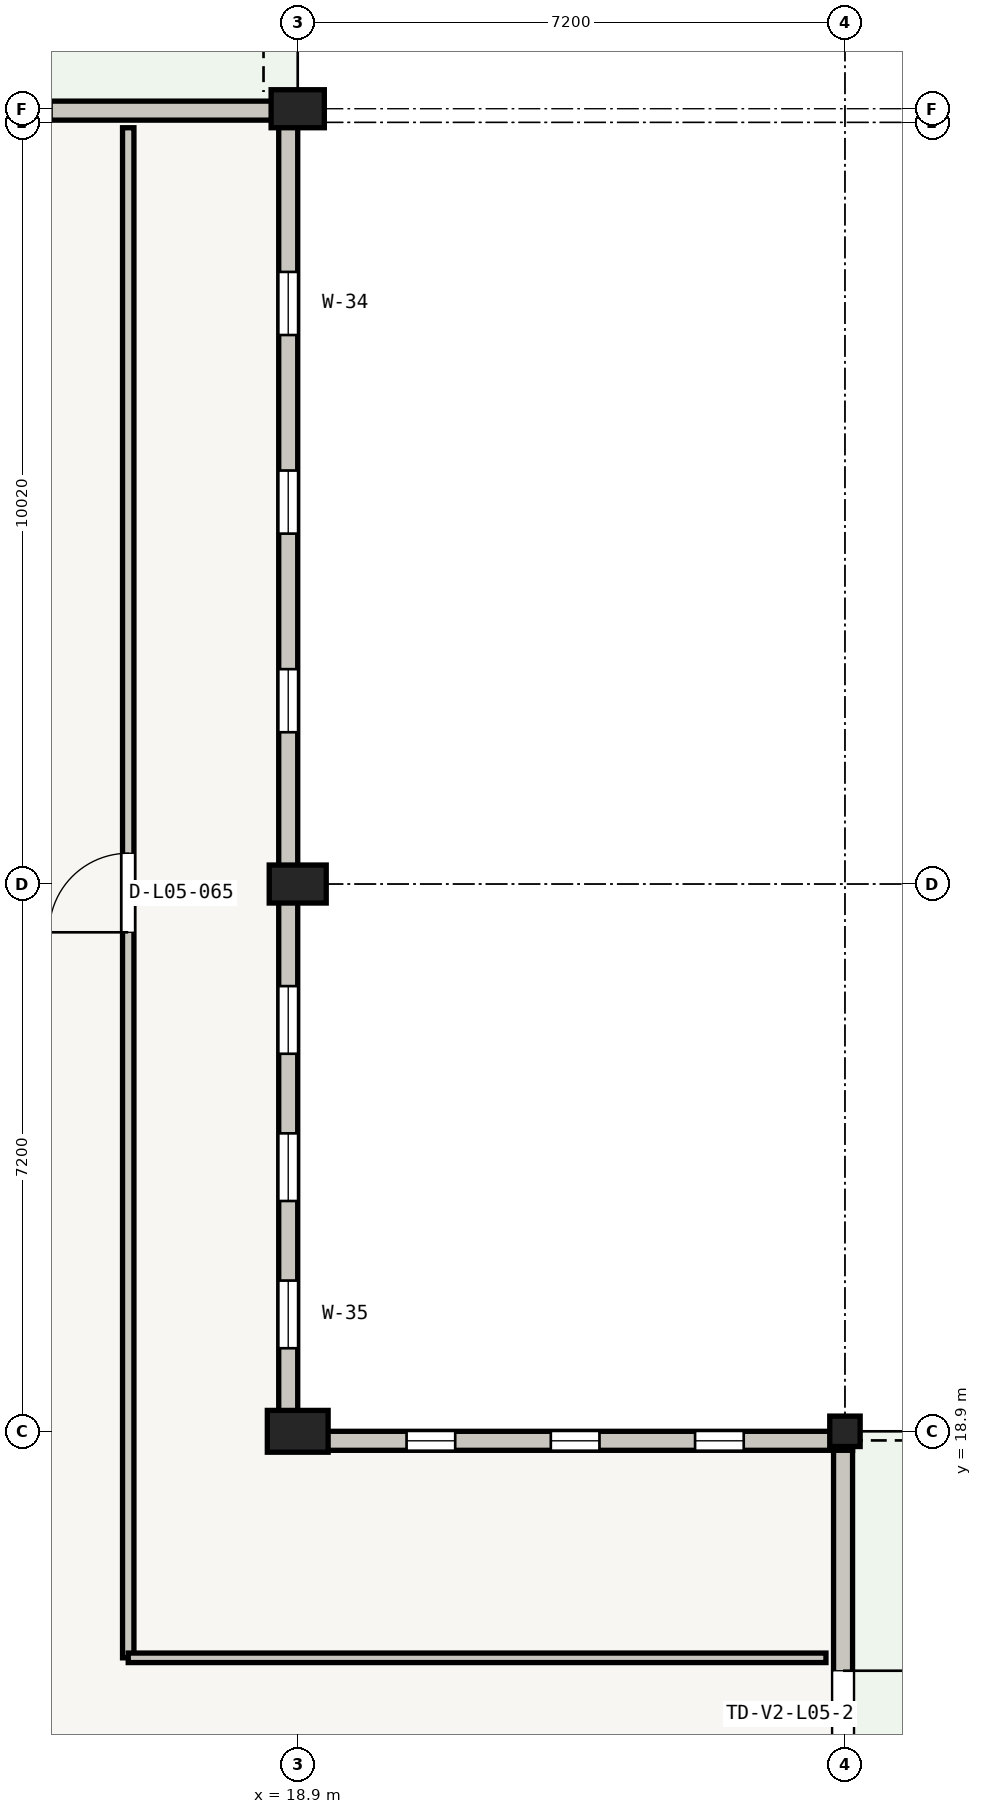
"""IFC4 building model, lengths in metres.
Left out: names, types, materials, properties, quantities, classifications, styles, units other than length and angle.
Written with IfcOpenShell. Run it as: python <this file> out.ifc"""

import sys

from ifc_helpers import new_model, si_unit, direction, frame, frame_2d, origin, origin_2d, place, context, subcontext, project, spatial, rectangle, extrude, element, fill, save


model = new_model("IFC4")
c1 = context("Model", 3, precision=1e-05, world=origin(), true_north=direction((0.0, 1.0)))
c2 = subcontext(c1, "Body", "Model", "MODEL_VIEW")
j1 = project(units=[si_unit("LENGTHUNIT", "METRE"), si_unit("PLANEANGLEUNIT", "RADIAN")], contexts=[c1])
p1 = place(None, origin())
s1 = spatial("IfcSite", under=j1, at=p1, CompositionType="ELEMENT")
p2 = place(p1, origin())
s2 = spatial("IfcBuilding", under=s1, at=p2, CompositionType="ELEMENT")
p3 = place(p2, frame((0.0, 0.0, 21.15)))
s3 = spatial("IfcBuildingStorey", under=s2, at=p3, CompositionType="ELEMENT", Elevation=21.15)
p4 = place(p3, frame((18.9, 18.9, 0.0), z_axis=(0.0, 0.0, 1.0), x_axis=(1.0, 0.0, 0.0)))
e1 = element("IfcColumn", 1, at=p4, inside=s3, PredefinedType="COLUMN", context=c2, shape_type="SweptSolid", body=[
    extrude(rectangle(XDim=0.8, YDim=0.55, at=origin_2d()), origin(), (0.0, 0.0, 1.0), 3.62),
])
p5 = place(p3, frame((18.9, 26.1, 0.0), z_axis=(0.0, 0.0, 1.0), x_axis=(1.0, 0.0, 0.0)))
e2 = element("IfcColumn", 2, at=p5, inside=s3, PredefinedType="COLUMN", context=c2, shape_type="SweptSolid", body=[
    extrude(rectangle(XDim=0.75, YDim=0.5, at=origin_2d()), origin(), (0.0, 0.0, 1.0), 3.62),
])
p6 = place(p3, frame((18.9, 36.3, 0.0), z_axis=(0.0, 0.0, 1.0), x_axis=(1.0, 0.0, 0.0)))
e3 = element("IfcColumn", 3, at=p6, inside=s3, PredefinedType="COLUMN", context=c2, shape_type="SweptSolid", body=[
    extrude(rectangle(XDim=0.7, YDim=0.5, at=origin_2d()), origin(), (0.0, 0.0, 1.0), 3.62),
])
p7 = place(p3, frame((26.1, 18.9, 0.0), z_axis=(0.0, 0.0, 1.0), x_axis=(1.0, 0.0, 0.0)))
e4 = element("IfcColumn", 4, at=p7, inside=s3, PredefinedType="COLUMN", context=c2, shape_type="SweptSolid", body=[
    extrude(rectangle(XDim=0.4, YDim=0.4, at=origin_2d()), origin(), (0.0, 0.0, 1.0), 3.62),
])
p8 = place(p3, frame((11.7, 36.275, 0.0), z_axis=(0.0, 0.0, 1.0), x_axis=(1.0, 0.0, 0.0)))
e5 = element("IfcWall", 5, at=p8, inside=s3, PredefinedType="STANDARD", context=c2, shape_type="SweptSolid", body=[
    extrude(rectangle(XDim=7.2, YDim=0.25, at=frame_2d((3.6, 0.0))), origin(), (0.0, 0.0, 1.0), 2.885),
])
p9 = place(p8, frame((1.368, 0.0, 0.6)))
e6 = element("IfcOpeningElement", 6, at=p9, cuts=e5, PredefinedType="OPENING", context=c2, shape_type="SweptSolid", body=[
    extrude(rectangle(XDim=0.72, YDim=1.85, at=frame_2d((0.36, 0.925))), frame((0.0, 0.125, 0.0), z_axis=(0.0, -1.0, 0.0), x_axis=(1.0, 0.0, 0.0)), (0.0, 0.0, 1.0), 0.25),
])
p10 = place(p8, frame((3.24, 0.0, 0.6)))
e7 = element("IfcOpeningElement", 7, at=p10, cuts=e5, PredefinedType="OPENING", context=c2, shape_type="SweptSolid", body=[
    extrude(rectangle(XDim=0.72, YDim=1.85, at=frame_2d((0.36, 0.925))), frame((0.0, 0.125, 0.0), z_axis=(0.0, -1.0, 0.0), x_axis=(1.0, 0.0, 0.0)), (0.0, 0.0, 1.0), 0.25),
])
p11 = place(p3, frame((18.775, 36.15, 0.0), z_axis=(0.0, 0.0, 1.0), x_axis=(0.0, -1.0, 0.0)))
e8 = element("IfcWall", 8, at=p11, inside=s3, PredefinedType="STANDARD", context=c2, shape_type="SweptSolid", body=[
    extrude(rectangle(XDim=10.05, YDim=0.25, at=frame_2d((5.025, 0.0))), origin(), (0.0, 0.0, 1.0), 2.885),
])
p12 = place(p11, frame((1.997, 0.0, 0.55)))
e9 = element("IfcOpeningElement", 9, at=p12, cuts=e8, PredefinedType="OPENING", context=c2, shape_type="SweptSolid", body=[
    extrude(rectangle(XDim=0.83, YDim=2.06, at=frame_2d((0.415, 1.03))), frame((0.0, 0.125, 0.0), z_axis=(0.0, -1.0, 0.0), x_axis=(1.0, 0.0, 0.0)), (0.0, 0.0, 1.0), 0.25),
])
p13 = place(p11, frame((4.61, 0.0, 0.55)))
e10 = element("IfcOpeningElement", 10, at=p13, cuts=e8, PredefinedType="OPENING", context=c2, shape_type="SweptSolid", body=[
    extrude(rectangle(XDim=0.83, YDim=2.06, at=frame_2d((0.415, 1.03))), frame((0.0, 0.125, 0.0), z_axis=(0.0, -1.0, 0.0), x_axis=(1.0, 0.0, 0.0)), (0.0, 0.0, 1.0), 0.25),
])
p14 = place(p11, frame((7.223, 0.0, 0.55)))
e11 = element("IfcOpeningElement", 11, at=p14, cuts=e8, PredefinedType="OPENING", context=c2, shape_type="SweptSolid", body=[
    extrude(rectangle(XDim=0.83, YDim=2.06, at=frame_2d((0.415, 1.03))), frame((0.0, 0.125, 0.0), z_axis=(0.0, -1.0, 0.0), x_axis=(1.0, 0.0, 0.0)), (0.0, 0.0, 1.0), 0.25),
])
p15 = place(p3, frame((18.775, 26.1, 0.0), z_axis=(0.0, 0.0, 1.0), x_axis=(0.0, -1.0, 0.0)))
e12 = element("IfcWall", 12, at=p15, inside=s3, PredefinedType="STANDARD", context=c2, shape_type="SweptSolid", body=[
    extrude(rectangle(XDim=7.45, YDim=0.25, at=frame_2d((3.725, 0.0))), origin(), (0.0, 0.0, 1.0), 2.885),
])
p16 = place(p15, frame((1.343, 0.0, 0.55)))
e13 = element("IfcOpeningElement", 13, at=p16, cuts=e12, PredefinedType="OPENING", context=c2, shape_type="SweptSolid", body=[
    extrude(rectangle(XDim=0.89, YDim=2.02, at=frame_2d((0.445, 1.01))), frame((0.0, 0.125, 0.0), z_axis=(0.0, -1.0, 0.0), x_axis=(1.0, 0.0, 0.0)), (0.0, 0.0, 1.0), 0.25),
])
p17 = place(p15, frame((3.28, 0.0, 0.55)))
e14 = element("IfcOpeningElement", 14, at=p17, cuts=e12, PredefinedType="OPENING", context=c2, shape_type="SweptSolid", body=[
    extrude(rectangle(XDim=0.89, YDim=2.02, at=frame_2d((0.445, 1.01))), frame((0.0, 0.125, 0.0), z_axis=(0.0, -1.0, 0.0), x_axis=(1.0, 0.0, 0.0)), (0.0, 0.0, 1.0), 0.25),
])
p18 = place(p15, frame((5.217, 0.0, 0.55)))
e15 = element("IfcOpeningElement", 15, at=p18, cuts=e12, PredefinedType="OPENING", context=c2, shape_type="SweptSolid", body=[
    extrude(rectangle(XDim=0.89, YDim=2.02, at=frame_2d((0.445, 1.01))), frame((0.0, 0.125, 0.0), z_axis=(0.0, -1.0, 0.0), x_axis=(1.0, 0.0, 0.0)), (0.0, 0.0, 1.0), 0.25),
])
p19 = place(p3, frame((18.9, 18.775, 0.0), z_axis=(0.0, 0.0, 1.0), x_axis=(1.0, 0.0, 0.0)))
e16 = element("IfcWall", 16, at=p19, inside=s3, PredefinedType="STANDARD", context=c2, shape_type="SweptSolid", body=[
    extrude(rectangle(XDim=7.3, YDim=0.25, at=frame_2d((3.65, 0.0))), origin(), (0.0, 0.0, 1.0), 2.655),
])
p20 = place(p19, frame((1.432, 0.0, 0.55)))
e17 = element("IfcOpeningElement", 17, at=p20, cuts=e16, PredefinedType="OPENING", context=c2, shape_type="SweptSolid", body=[
    extrude(rectangle(XDim=0.64, YDim=1.85, at=frame_2d((0.32, 0.925))), frame((0.0, 0.125, 0.0), z_axis=(0.0, -1.0, 0.0), x_axis=(1.0, 0.0, 0.0)), (0.0, 0.0, 1.0), 0.25),
])
p21 = place(p19, frame((3.33, 0.0, 0.55)))
e18 = element("IfcOpeningElement", 18, at=p21, cuts=e16, PredefinedType="OPENING", context=c2, shape_type="SweptSolid", body=[
    extrude(rectangle(XDim=0.64, YDim=1.85, at=frame_2d((0.32, 0.925))), frame((0.0, 0.125, 0.0), z_axis=(0.0, -1.0, 0.0), x_axis=(1.0, 0.0, 0.0)), (0.0, 0.0, 1.0), 0.25),
])
p22 = place(p19, frame((5.228, 0.0, 0.55)))
e19 = element("IfcOpeningElement", 19, at=p22, cuts=e16, PredefinedType="OPENING", context=c2, shape_type="SweptSolid", body=[
    extrude(rectangle(XDim=0.64, YDim=1.85, at=frame_2d((0.32, 0.925))), frame((0.0, 0.125, 0.0), z_axis=(0.0, -1.0, 0.0), x_axis=(1.0, 0.0, 0.0)), (0.0, 0.0, 1.0), 0.25),
])
p23 = place(p3, frame((26.075, 18.65, 0.0), z_axis=(0.0, 0.0, 1.0), x_axis=(0.0, -1.0, 0.0)))
e20 = element("IfcWall", 20, at=p23, inside=s3, PredefinedType="STANDARD", context=c2, shape_type="SweptSolid", body=[
    extrude(rectangle(XDim=6.95, YDim=0.25, at=frame_2d((3.475, 0.0))), origin(), (0.0, 0.0, 1.0), 2.655),
])
p24 = place(p23, frame((2.9, 0.0, 0.19)))
e21 = element("IfcOpeningElement", 21, at=p24, cuts=e20, PredefinedType="OPENING", context=c2, shape_type="SweptSolid", body=[
    extrude(rectangle(XDim=1.15, YDim=2.02, at=frame_2d((0.575, 1.01))), frame((0.0, 0.125, 0.0), z_axis=(0.0, -1.0, 0.0), x_axis=(1.0, 0.0, 0.0)), (0.0, 0.0, 1.0), 0.25),
])
p25 = place(p3, frame((16.67, 15.92, 0.0), z_axis=(0.0, 0.0, 1.0), x_axis=(0.0, 1.0, 0.0)))
e22 = element("IfcWall", 22, at=p25, inside=s3, PredefinedType="PARTITIONING", context=c2, shape_type="SweptSolid", body=[
    extrude(rectangle(XDim=20.13, YDim=0.15, at=frame_2d((10.065, 0.0))), origin(), (0.0, 0.0, 1.0), 2.64),
])
p26 = place(p25, frame((9.545, 0.0, 0.0)))
e23 = element("IfcOpeningElement", 23, at=p26, cuts=e22, PredefinedType="OPENING", context=c2, shape_type="SweptSolid", body=[
    extrude(rectangle(XDim=1.04, YDim=2.05, at=frame_2d((0.52, 1.025))), frame((0.0, 0.075, 0.0), z_axis=(0.0, -1.0, 0.0), x_axis=(1.0, 0.0, 0.0)), (0.0, 0.0, 1.0), 0.15),
])
p27 = place(p3, frame((25.85, 15.92, 0.0), z_axis=(0.0, 0.0, 1.0), x_axis=(-1.0, 0.0, 0.0)))
e24 = element("IfcWall", 24, at=p27, inside=s3, PredefinedType="PARTITIONING", context=c2, shape_type="SweptSolid", body=[
    extrude(rectangle(XDim=9.18, YDim=0.125, at=frame_2d((4.59, 0.0))), origin(), (0.0, 0.0, 1.0), 2.64),
])
p28 = place(p12, origin())
e25 = element("IfcWindow", 25, at=p28, inside=s3, PartitioningType="SINGLE_PANEL", PredefinedType="WINDOW", context=c2, shape_type="SweptSolid", body=[
    extrude(rectangle(XDim=0.83, YDim=2.06, at=frame_2d((0.415, 1.03))), frame((0.0, 0.03, 0.0), z_axis=(0.0, -1.0, 0.0), x_axis=(1.0, 0.0, 0.0)), (0.0, 0.0, 1.0), 0.06),
])
fill(e9, e25)
p29 = place(p13, origin())
e26 = element("IfcWindow", 26, at=p29, inside=s3, PartitioningType="SINGLE_PANEL", PredefinedType="WINDOW", context=c2, shape_type="SweptSolid", body=[
    extrude(rectangle(XDim=0.83, YDim=2.06, at=frame_2d((0.415, 1.03))), frame((0.0, 0.03, 0.0), z_axis=(0.0, -1.0, 0.0), x_axis=(1.0, 0.0, 0.0)), (0.0, 0.0, 1.0), 0.06),
])
fill(e10, e26)
p30 = place(p14, origin())
e27 = element("IfcWindow", 27, at=p30, inside=s3, PartitioningType="SINGLE_PANEL", PredefinedType="WINDOW", context=c2, shape_type="SweptSolid", body=[
    extrude(rectangle(XDim=0.83, YDim=2.06, at=frame_2d((0.415, 1.03))), frame((0.0, 0.03, 0.0), z_axis=(0.0, -1.0, 0.0), x_axis=(1.0, 0.0, 0.0)), (0.0, 0.0, 1.0), 0.06),
])
fill(e11, e27)
p31 = place(p16, origin())
e28 = element("IfcWindow", 28, at=p31, inside=s3, PartitioningType="DOUBLE_PANEL_VERTICAL", PredefinedType="WINDOW", context=c2, shape_type="SweptSolid", body=[
    extrude(rectangle(XDim=0.89, YDim=2.02, at=frame_2d((0.445, 1.01))), frame((0.0, 0.03, 0.0), z_axis=(0.0, -1.0, 0.0), x_axis=(1.0, 0.0, 0.0)), (0.0, 0.0, 1.0), 0.06),
])
fill(e13, e28)
p32 = place(p17, origin())
e29 = element("IfcWindow", 29, at=p32, inside=s3, PartitioningType="DOUBLE_PANEL_VERTICAL", PredefinedType="WINDOW", context=c2, shape_type="SweptSolid", body=[
    extrude(rectangle(XDim=0.89, YDim=2.02, at=frame_2d((0.445, 1.01))), frame((0.0, 0.03, 0.0), z_axis=(0.0, -1.0, 0.0), x_axis=(1.0, 0.0, 0.0)), (0.0, 0.0, 1.0), 0.06),
])
fill(e14, e29)
p33 = place(p18, origin())
e30 = element("IfcWindow", 30, at=p33, inside=s3, PartitioningType="DOUBLE_PANEL_VERTICAL", PredefinedType="WINDOW", context=c2, shape_type="SweptSolid", body=[
    extrude(rectangle(XDim=0.89, YDim=2.02, at=frame_2d((0.445, 1.01))), frame((0.0, 0.03, 0.0), z_axis=(0.0, -1.0, 0.0), x_axis=(1.0, 0.0, 0.0)), (0.0, 0.0, 1.0), 0.06),
])
fill(e15, e30)
p34 = place(p20, origin())
e31 = element("IfcWindow", 31, at=p34, inside=s3, PartitioningType="SINGLE_PANEL", PredefinedType="WINDOW", context=c2, shape_type="SweptSolid", body=[
    extrude(rectangle(XDim=0.64, YDim=1.85, at=frame_2d((0.32, 0.925))), frame((0.0, 0.03, 0.0), z_axis=(0.0, -1.0, 0.0), x_axis=(1.0, 0.0, 0.0)), (0.0, 0.0, 1.0), 0.06),
])
fill(e17, e31)
p35 = place(p21, origin())
e32 = element("IfcWindow", 32, at=p35, inside=s3, PartitioningType="SINGLE_PANEL", PredefinedType="WINDOW", context=c2, shape_type="SweptSolid", body=[
    extrude(rectangle(XDim=0.64, YDim=1.85, at=frame_2d((0.32, 0.925))), frame((0.0, 0.03, 0.0), z_axis=(0.0, -1.0, 0.0), x_axis=(1.0, 0.0, 0.0)), (0.0, 0.0, 1.0), 0.06),
])
fill(e18, e32)
p36 = place(p22, origin())
e33 = element("IfcWindow", 33, at=p36, inside=s3, PartitioningType="SINGLE_PANEL", PredefinedType="WINDOW", context=c2, shape_type="SweptSolid", body=[
    extrude(rectangle(XDim=0.64, YDim=1.85, at=frame_2d((0.32, 0.925))), frame((0.0, 0.03, 0.0), z_axis=(0.0, -1.0, 0.0), x_axis=(1.0, 0.0, 0.0)), (0.0, 0.0, 1.0), 0.06),
])
fill(e19, e33)
p37 = place(p24, origin())
e34 = element("IfcDoor", 34, at=p37, inside=s3, OperationType="SINGLE_SWING_LEFT", PredefinedType="DOOR", context=c2, shape_type="SweptSolid", body=[
    extrude(rectangle(XDim=1.15, YDim=2.02, at=frame_2d((0.575, 1.01))), frame((0.0, 0.025, 0.0), z_axis=(0.0, -1.0, 0.0), x_axis=(1.0, 0.0, 0.0)), (0.0, 0.0, 1.0), 0.05),
])
fill(e21, e34)
p38 = place(p26, origin())
e35 = element("IfcDoor", 35, at=p38, inside=s3, OperationType="SINGLE_SWING_LEFT", PredefinedType="DOOR", context=c2, shape_type="SweptSolid", body=[
    extrude(rectangle(XDim=1.04, YDim=2.05, at=frame_2d((0.52, 1.025))), frame((0.0, 0.025, 0.0), z_axis=(0.0, -1.0, 0.0), x_axis=(1.0, 0.0, 0.0)), (0.0, 0.0, 1.0), 0.05),
])
fill(e23, e35)
save(model, sys.argv[1])
